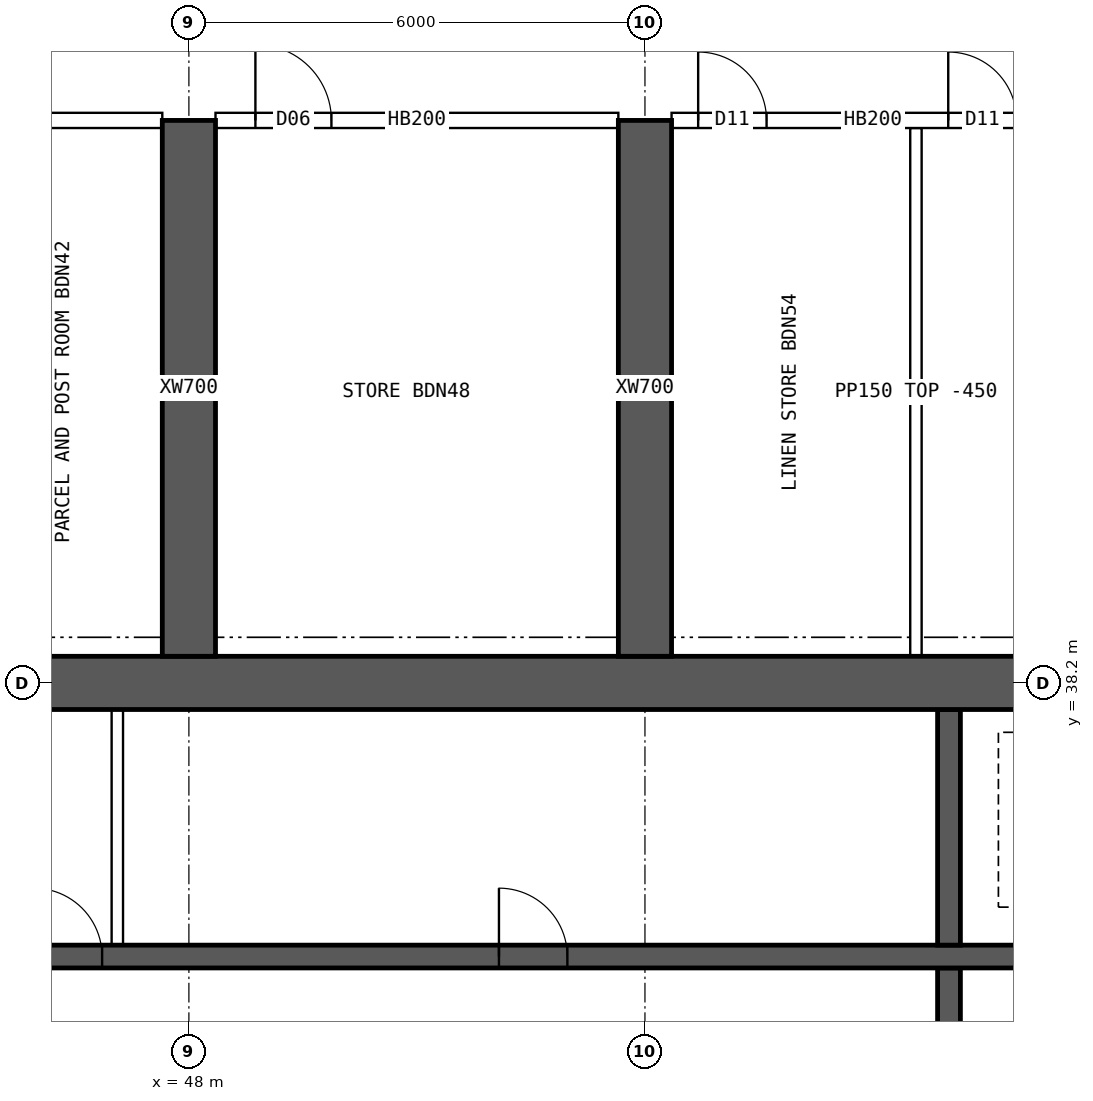
"""IFC4 building model, lengths in metres.
Left out: names, types, materials, properties, quantities, classifications, styles, units other than length and angle.
Written with IfcOpenShell. Run it as: python <this file> out.ifc"""

import sys

from ifc_helpers import new_model, si_unit, direction, frame, frame_2d, origin, place, context, subcontext, project, spatial, rectangle, extrude, element, fill, save


model = new_model("IFC4")
c1 = context("Model", 3, precision=1e-05, world=origin(), true_north=direction((0.0, 1.0)))
c2 = subcontext(c1, "Body", "Model", "MODEL_VIEW")
j1 = project(units=[si_unit("LENGTHUNIT", "METRE"), si_unit("PLANEANGLEUNIT", "RADIAN")], contexts=[c1])
p1 = place(None, origin())
s1 = spatial("IfcSite", under=j1, at=p1, CompositionType="ELEMENT")
p2 = place(p1, origin())
s2 = spatial("IfcBuilding", under=s1, at=p2, CompositionType="ELEMENT")
p3 = place(p2, frame((0.0, 0.0, 227.8)))
s3 = spatial("IfcBuildingStorey", under=s2, at=p3, CompositionType="ELEMENT", Elevation=227.8)
p4 = place(p3, frame((18.0, 38.2, 0.0), z_axis=(0.0, 0.0, 1.0), x_axis=(1.0, 0.0, 0.0)))
e1 = element("IfcWall", 1, at=p4, inside=s3, PredefinedType="SHEAR", context=c2, shape_type="SweptSolid", body=[
    extrude(rectangle(XDim=48.0, YDim=0.7, at=frame_2d((24.0, 0.0))), origin(), (0.0, 0.0, 1.0), 3.75),
])
p5 = place(p3, frame((18.35, 34.6, 0.0), z_axis=(0.0, 0.0, 1.0), x_axis=(1.0, 0.0, 0.0)))
e2 = element("IfcWall", 2, at=p5, inside=s3, PredefinedType="SHEAR", context=c2, shape_type="SweptSolid", body=[
    extrude(rectangle(XDim=47.3, YDim=0.3, at=frame_2d((23.65, 0.0))), origin(), (0.0, 0.0, 1.0), 3.75),
])
p6 = place(p5, frame((0.9, 0.0, 0.0)))
e3 = element("IfcOpeningElement", 3, at=p6, cuts=e2, PredefinedType="OPENING", context=c2, shape_type="SweptSolid", body=[
    extrude(rectangle(XDim=1.1, YDim=2.1, at=frame_2d((0.55, 1.05))), frame((0.0, 0.16, 0.0), z_axis=(0.0, -1.0, 0.0), x_axis=(1.0, 0.0, 0.0)), (0.0, 0.0, 1.0), 0.32),
])
p7 = place(p5, frame((45.3, 0.0, 0.0)))
e4 = element("IfcOpeningElement", 4, at=p7, cuts=e2, PredefinedType="OPENING", context=c2, shape_type="SweptSolid", body=[
    extrude(rectangle(XDim=1.1, YDim=2.1, at=frame_2d((0.55, 1.05))), frame((0.0, 0.16, 0.0), z_axis=(0.0, -1.0, 0.0), x_axis=(1.0, 0.0, 0.0)), (0.0, 0.0, 1.0), 0.32),
])
p8 = place(p5, frame((4.25, 0.0, 0.0)))
e5 = element("IfcOpeningElement", 5, at=p8, cuts=e2, PredefinedType="OPENING", context=c2, shape_type="SweptSolid", body=[
    extrude(rectangle(XDim=0.9, YDim=2.1, at=frame_2d((0.45, 1.05))), frame((0.0, 0.16, 0.0), z_axis=(0.0, -1.0, 0.0), x_axis=(1.0, 0.0, 0.0)), (0.0, 0.0, 1.0), 0.32),
])
p9 = place(p5, frame((42.15, 0.0, 0.0)))
e6 = element("IfcOpeningElement", 6, at=p9, cuts=e2, PredefinedType="OPENING", context=c2, shape_type="SweptSolid", body=[
    extrude(rectangle(XDim=0.9, YDim=2.1, at=frame_2d((0.45, 1.05))), frame((0.0, 0.16, 0.0), z_axis=(0.0, -1.0, 0.0), x_axis=(1.0, 0.0, 0.0)), (0.0, 0.0, 1.0), 0.32),
])
p10 = place(p5, frame((9.025, 0.0, 0.0)))
e7 = element("IfcOpeningElement", 7, at=p10, cuts=e2, PredefinedType="OPENING", context=c2, shape_type="SweptSolid", body=[
    extrude(rectangle(XDim=0.9, YDim=2.1, at=frame_2d((0.45, 1.05))), frame((0.0, 0.16, 0.0), z_axis=(0.0, -1.0, 0.0), x_axis=(1.0, 0.0, 0.0)), (0.0, 0.0, 1.0), 0.32),
])
p11 = place(p5, frame((12.999, 0.0, 0.0)))
e8 = element("IfcOpeningElement", 8, at=p11, cuts=e2, PredefinedType="OPENING", context=c2, shape_type="SweptSolid", body=[
    extrude(rectangle(XDim=0.9, YDim=2.1, at=frame_2d((0.45, 1.05))), frame((0.0, 0.16, 0.0), z_axis=(0.0, -1.0, 0.0), x_axis=(1.0, 0.0, 0.0)), (0.0, 0.0, 1.0), 0.32),
])
p12 = place(p5, frame((16.646, 0.0, 0.0)))
e9 = element("IfcOpeningElement", 9, at=p12, cuts=e2, PredefinedType="OPENING", context=c2, shape_type="SweptSolid", body=[
    extrude(rectangle(XDim=0.9, YDim=2.1, at=frame_2d((0.45, 1.05))), frame((0.0, 0.16, 0.0), z_axis=(0.0, -1.0, 0.0), x_axis=(1.0, 0.0, 0.0)), (0.0, 0.0, 1.0), 0.32),
])
p13 = place(p5, frame((20.405, 0.0, 0.0)))
e10 = element("IfcOpeningElement", 10, at=p13, cuts=e2, PredefinedType="OPENING", context=c2, shape_type="SweptSolid", body=[
    extrude(rectangle(XDim=0.9, YDim=2.1, at=frame_2d((0.45, 1.05))), frame((0.0, 0.16, 0.0), z_axis=(0.0, -1.0, 0.0), x_axis=(1.0, 0.0, 0.0)), (0.0, 0.0, 1.0), 0.32),
])
p14 = place(p5, frame((24.811, 0.0, 0.0)))
e11 = element("IfcOpeningElement", 11, at=p14, cuts=e2, PredefinedType="OPENING", context=c2, shape_type="SweptSolid", body=[
    extrude(rectangle(XDim=0.9, YDim=2.1, at=frame_2d((0.45, 1.05))), frame((0.0, 0.16, 0.0), z_axis=(0.0, -1.0, 0.0), x_axis=(1.0, 0.0, 0.0)), (0.0, 0.0, 1.0), 0.32),
])
p15 = place(p5, frame((27.608, 0.0, 0.0)))
e12 = element("IfcOpeningElement", 12, at=p15, cuts=e2, PredefinedType="OPENING", context=c2, shape_type="SweptSolid", body=[
    extrude(rectangle(XDim=0.9, YDim=2.1, at=frame_2d((0.45, 1.05))), frame((0.0, 0.16, 0.0), z_axis=(0.0, -1.0, 0.0), x_axis=(1.0, 0.0, 0.0)), (0.0, 0.0, 1.0), 0.32),
])
p16 = place(p5, frame((33.729, 0.0, 0.0)))
e13 = element("IfcOpeningElement", 13, at=p16, cuts=e2, PredefinedType="OPENING", context=c2, shape_type="SweptSolid", body=[
    extrude(rectangle(XDim=0.9, YDim=2.1, at=frame_2d((0.45, 1.05))), frame((0.0, 0.16, 0.0), z_axis=(0.0, -1.0, 0.0), x_axis=(1.0, 0.0, 0.0)), (0.0, 0.0, 1.0), 0.32),
])
p17 = place(p3, frame((58.0, 30.55, 0.0), z_axis=(0.0, 0.0, 1.0), x_axis=(0.0, 1.0, 0.0)))
e14 = element("IfcWall", 14, at=p17, inside=s3, PredefinedType="SHEAR", context=c2, shape_type="SweptSolid", body=[
    extrude(rectangle(XDim=3.9, YDim=0.3, at=frame_2d((1.95, 0.0))), origin(), (0.0, 0.0, 1.0), 3.75),
])
p18 = place(p17, frame((1.4, 0.0, 0.0)))
e15 = element("IfcOpeningElement", 15, at=p18, cuts=e14, PredefinedType="OPENING", context=c2, shape_type="SweptSolid", body=[
    extrude(rectangle(XDim=1.2, YDim=2.1, at=frame_2d((0.6, 1.05))), frame((0.0, 0.16, 0.0), z_axis=(0.0, -1.0, 0.0), x_axis=(1.0, 0.0, 0.0)), (0.0, 0.0, 1.0), 0.32),
])
p19 = place(p3, frame((58.0, 34.75, 0.0), z_axis=(0.0, 0.0, 1.0), x_axis=(0.0, 1.0, 0.0)))
e16 = element("IfcWall", 16, at=p19, inside=s3, PredefinedType="SHEAR", context=c2, shape_type="SweptSolid", body=[
    extrude(rectangle(XDim=3.1, YDim=0.3, at=frame_2d((1.55, 0.0))), origin(), (0.0, 0.0, 1.0), 3.75),
])
for number, where, z_axis, x_axis in (
    (17, (48.0, 38.55, 0.0), (0.0, 0.0, 1.0), (0.0, 1.0, 0.0)),
    (18, (54.0, 38.55, 0.0), (0.0, 0.0, 1.0), (0.0, 1.0, 0.0)),
):
    element("IfcWall", number, at=place(p3, frame(where, z_axis=z_axis, x_axis=x_axis)), inside=s3, PredefinedType="SHEAR", context=c2, shape_type="SweptSolid", body=[
        extrude(rectangle(XDim=7.05, YDim=0.7, at=frame_2d((3.525, 0.0))), origin(), (0.0, 0.0, 1.0), 3.75),
    ])
p20 = place(p3, frame((47.058, 34.75, 0.0), z_axis=(0.0, 0.0, 1.0), x_axis=(0.0, 1.0, 0.0)))
e19 = element("IfcWall", 19, at=p20, inside=s3, PredefinedType="SOLIDWALL", context=c2, shape_type="SweptSolid", body=[
    extrude(rectangle(XDim=3.1, YDim=0.15, at=frame_2d((1.55, 0.0))), origin(), (0.0, 0.0, 1.0), 3.3),
])
p21 = place(p3, frame((42.35, 45.6, 0.0), z_axis=(0.0, 0.0, 1.0), x_axis=(1.0, 0.0, 0.0)))
e20 = element("IfcWall", 20, at=p21, inside=s3, PredefinedType="SOLIDWALL", context=c2, shape_type="SweptSolid", body=[
    extrude(rectangle(XDim=5.3, YDim=0.2, at=frame_2d((2.65, 0.0))), origin(), (0.0, 0.0, 1.0), 3.3),
])
p22 = place(p21, frame((0.35, 0.0, 0.0)))
e21 = element("IfcOpeningElement", 21, at=p22, cuts=e20, PredefinedType="OPENING", context=c2, shape_type="SweptSolid", body=[
    extrude(rectangle(XDim=0.9, YDim=2.1, at=frame_2d((0.45, 1.05))), frame((0.0, 0.11, 0.0), z_axis=(0.0, -1.0, 0.0), x_axis=(1.0, 0.0, 0.0)), (0.0, 0.0, 1.0), 0.22),
])
p23 = place(p21, frame((2.795, 0.0, 0.0)))
e22 = element("IfcOpeningElement", 22, at=p23, cuts=e20, PredefinedType="OPENING", context=c2, shape_type="SweptSolid", body=[
    extrude(rectangle(XDim=0.9, YDim=2.1, at=frame_2d((0.45, 1.05))), frame((0.0, 0.11, 0.0), z_axis=(0.0, -1.0, 0.0), x_axis=(1.0, 0.0, 0.0)), (0.0, 0.0, 1.0), 0.22),
])
p24 = place(p3, frame((48.35, 45.6, 0.0), z_axis=(0.0, 0.0, 1.0), x_axis=(1.0, 0.0, 0.0)))
e23 = element("IfcWall", 23, at=p24, inside=s3, PredefinedType="SOLIDWALL", context=c2, shape_type="SweptSolid", body=[
    extrude(rectangle(XDim=5.3, YDim=0.2, at=frame_2d((2.65, 0.0))), origin(), (0.0, 0.0, 1.0), 3.3),
])
p25 = place(p24, frame((0.525, 0.0, 0.0)))
e24 = element("IfcOpeningElement", 24, at=p25, cuts=e23, PredefinedType="OPENING", context=c2, shape_type="SweptSolid", body=[
    extrude(rectangle(XDim=1.0, YDim=2.1, at=frame_2d((0.5, 1.05))), frame((0.0, 0.11, 0.0), z_axis=(0.0, -1.0, 0.0), x_axis=(1.0, 0.0, 0.0)), (0.0, 0.0, 1.0), 0.22),
])
p26 = place(p3, frame((54.35, 45.6, 0.0), z_axis=(0.0, 0.0, 1.0), x_axis=(1.0, 0.0, 0.0)))
e25 = element("IfcWall", 25, at=p26, inside=s3, PredefinedType="SOLIDWALL", context=c2, shape_type="SweptSolid", body=[
    extrude(rectangle(XDim=5.3, YDim=0.2, at=frame_2d((2.65, 0.0))), origin(), (0.0, 0.0, 1.0), 3.3),
])
p27 = place(p26, frame((0.35, 0.0, 0.0)))
e26 = element("IfcOpeningElement", 26, at=p27, cuts=e25, PredefinedType="OPENING", context=c2, shape_type="SweptSolid", body=[
    extrude(rectangle(XDim=0.9, YDim=2.1, at=frame_2d((0.45, 1.05))), frame((0.0, 0.11, 0.0), z_axis=(0.0, -1.0, 0.0), x_axis=(1.0, 0.0, 0.0)), (0.0, 0.0, 1.0), 0.22),
])
p28 = place(p26, frame((3.64, 0.0, 0.0)))
e27 = element("IfcOpeningElement", 27, at=p28, cuts=e25, PredefinedType="OPENING", context=c2, shape_type="SweptSolid", body=[
    extrude(rectangle(XDim=0.9, YDim=2.1, at=frame_2d((0.45, 1.05))), frame((0.0, 0.11, 0.0), z_axis=(0.0, -1.0, 0.0), x_axis=(1.0, 0.0, 0.0)), (0.0, 0.0, 1.0), 0.22),
])
p29 = place(p3, frame((57.565, 38.55, 0.0), z_axis=(0.0, 0.0, 1.0), x_axis=(0.0, 1.0, 0.0)))
e28 = element("IfcWall", 28, at=p29, inside=s3, PredefinedType="PARTITIONING", context=c2, shape_type="SweptSolid", body=[
    extrude(rectangle(XDim=6.95, YDim=0.15, at=frame_2d((3.475, 0.0))), origin(), (0.0, 0.0, 1.0), 3.3),
])
p30 = place(p15, origin())
e29 = element("IfcDoor", 29, at=p30, inside=s3, OperationType="SINGLE_SWING_LEFT", PredefinedType="DOOR", context=c2, shape_type="SweptSolid", body=[
    extrude(rectangle(XDim=0.9, YDim=2.1, at=frame_2d((0.45, 1.05))), frame((0.0, 0.025, 0.0), z_axis=(0.0, -1.0, 0.0), x_axis=(1.0, 0.0, 0.0)), (0.0, 0.0, 1.0), 0.05),
])
fill(e12, e29)
p31 = place(p16, origin())
e30 = element("IfcDoor", 30, at=p31, inside=s3, OperationType="SINGLE_SWING_LEFT", PredefinedType="DOOR", context=c2, shape_type="SweptSolid", body=[
    extrude(rectangle(XDim=0.9, YDim=2.1, at=frame_2d((0.45, 1.05))), frame((0.0, 0.025, 0.0), z_axis=(0.0, -1.0, 0.0), x_axis=(1.0, 0.0, 0.0)), (0.0, 0.0, 1.0), 0.05),
])
fill(e13, e30)
p32 = place(p25, origin())
e31 = element("IfcDoor", 31, at=p32, inside=s3, OperationType="SINGLE_SWING_LEFT", PredefinedType="DOOR", context=c2, shape_type="SweptSolid", body=[
    extrude(rectangle(XDim=1.0, YDim=2.1, at=frame_2d((0.5, 1.05))), frame((0.0, 0.025, 0.0), z_axis=(0.0, -1.0, 0.0), x_axis=(1.0, 0.0, 0.0)), (0.0, 0.0, 1.0), 0.05),
])
fill(e24, e31)
p33 = place(p27, origin())
e32 = element("IfcDoor", 32, at=p33, inside=s3, OperationType="SINGLE_SWING_LEFT", PredefinedType="DOOR", context=c2, shape_type="SweptSolid", body=[
    extrude(rectangle(XDim=0.9, YDim=2.1, at=frame_2d((0.45, 1.05))), frame((0.0, 0.025, 0.0), z_axis=(0.0, -1.0, 0.0), x_axis=(1.0, 0.0, 0.0)), (0.0, 0.0, 1.0), 0.05),
])
fill(e26, e32)
p34 = place(p28, origin())
e33 = element("IfcDoor", 33, at=p34, inside=s3, OperationType="SINGLE_SWING_LEFT", PredefinedType="DOOR", context=c2, shape_type="SweptSolid", body=[
    extrude(rectangle(XDim=0.9, YDim=2.1, at=frame_2d((0.45, 1.05))), frame((0.0, 0.025, 0.0), z_axis=(0.0, -1.0, 0.0), x_axis=(1.0, 0.0, 0.0)), (0.0, 0.0, 1.0), 0.05),
])
fill(e27, e33)
save(model, sys.argv[1])
